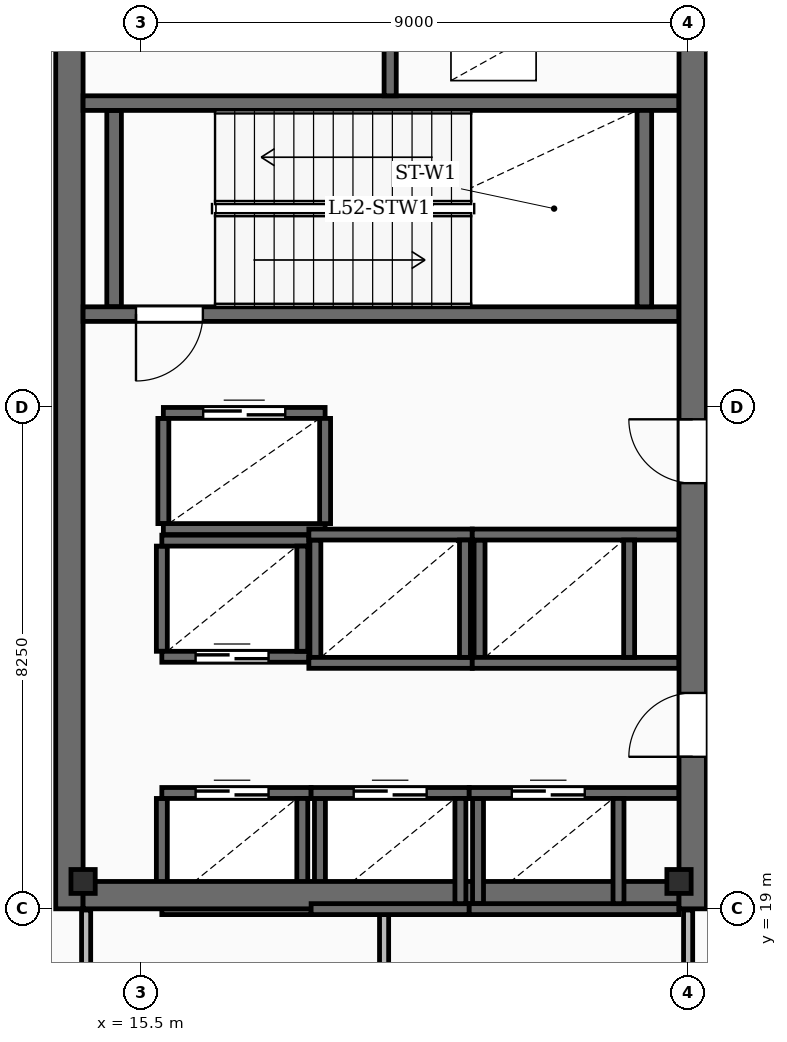
"""IFC4 building model, lengths in metres.
Left out: names, types, materials, properties, quantities, classifications, styles, units other than length and angle.
Written with IfcOpenShell. Run it as: python <this file> out.ifc"""

import sys

from ifc_helpers import new_model, si_unit, direction, frame, frame_2d, origin, origin_2d, place, context, subcontext, project, spatial, rectangle, i_section, extrude, element, fill, save


model = new_model("IFC4")
c1 = context("Model", 3, precision=1e-05, world=origin(), true_north=direction((0.0, 1.0)))
c2 = subcontext(c1, "Body", "Model", "MODEL_VIEW")
j1 = project(units=[si_unit("LENGTHUNIT", "METRE"), si_unit("PLANEANGLEUNIT", "RADIAN")], contexts=[c1])
p1 = place(None, origin())
s1 = spatial("IfcSite", under=j1, at=p1, CompositionType="ELEMENT")
p2 = place(p1, origin())
s2 = spatial("IfcBuilding", under=s1, at=p2, CompositionType="ELEMENT")
p3 = place(p2, frame((0.0, 0.0, 216.15)))
s3 = spatial("IfcBuildingStorey", under=s2, at=p3, CompositionType="ELEMENT", Elevation=216.15)
p4 = place(p3, frame((14.325, 19.0, -0.45), z_axis=(0.0, 0.0, 1.0), x_axis=(0.0, 1.0, 0.0)))
e1 = element("IfcWall", 1, at=p4, inside=s3, PredefinedType="SHEAR", context=c2, shape_type="SweptSolid", body=[
    extrude(rectangle(XDim=15.3, YDim=0.45, at=frame_2d((7.65, 0.0))), origin(), (0.0, 0.0, 1.0), 4.98),
])
p5 = place(p3, frame((24.575, 19.0, -0.45), z_axis=(0.0, 0.0, 1.0), x_axis=(0.0, 1.0, 0.0)))
e2 = element("IfcWall", 2, at=p5, inside=s3, PredefinedType="SHEAR", context=c2, shape_type="SweptSolid", body=[
    extrude(rectangle(XDim=15.3, YDim=0.45, at=frame_2d((7.65, 0.0))), origin(), (0.0, 0.0, 1.0), 4.98),
])
p6 = place(p5, frame((2.5, 0.0, 0.45)))
e3 = element("IfcOpeningElement", 3, at=p6, cuts=e2, PredefinedType="OPENING", context=c2, shape_type="SweptSolid", body=[
    extrude(rectangle(XDim=1.05, YDim=2.15, at=frame_2d((0.525, 1.075))), frame((0.0, 0.235, 0.0), z_axis=(0.0, -1.0, 0.0), x_axis=(1.0, 0.0, 0.0)), (0.0, 0.0, 1.0), 0.47),
])
p7 = place(p5, frame((7.0, 0.0, 0.45)))
e4 = element("IfcOpeningElement", 4, at=p7, cuts=e2, PredefinedType="OPENING", context=c2, shape_type="SweptSolid", body=[
    extrude(rectangle(XDim=1.05, YDim=2.15, at=frame_2d((0.525, 1.075))), frame((0.0, 0.235, 0.0), z_axis=(0.0, -1.0, 0.0), x_axis=(1.0, 0.0, 0.0)), (0.0, 0.0, 1.0), 0.47),
])
p8 = place(p3, frame((14.55, 19.225, -0.45), z_axis=(0.0, 0.0, 1.0), x_axis=(1.0, 0.0, 0.0)))
e5 = element("IfcWall", 5, at=p8, inside=s3, PredefinedType="SHEAR", context=c2, shape_type="SweptSolid", body=[
    extrude(rectangle(XDim=9.8, YDim=0.45, at=frame_2d((4.9, 0.0))), origin(), (0.0, 0.0, 1.0), 4.98),
])
for number, where, z_axis, x_axis in (
    (6, (14.55, 19.45, -0.45), (0.0, 0.0, 1.0), (1.0, 0.0, 0.0)),
    (7, (24.35, 19.45, -0.45), (0.0, 0.0, 1.0), (1.0, 0.0, 0.0)),
):
    element("IfcColumn", number, at=place(p3, frame(where, z_axis=z_axis, x_axis=x_axis)), inside=s3, PredefinedType="COLUMN", context=c2, shape_type="SweptSolid", body=[
        extrude(i_section(OverallWidth=0.399, OverallDepth=0.393, WebThickness=0.023, FlangeThickness=0.037, FilletRadius=0.02, at=origin_2d()), origin(), (0.0, 0.0, 1.0), 4.98),
    ])
p9 = place(p3, frame((10.211, 10.701, 0.0), z_axis=(0.0, 0.0, 1.0), x_axis=(0.113203107947, 0.993571867733, 0.0)))
e8 = element("IfcWall", 8, at=p9, inside=s3, PredefinedType="SOLIDWALL", context=c2, shape_type="SweptSolid", body=[
    extrude(rectangle(XDim=34.5, YDim=0.36, at=frame_2d((17.25, 0.0))), origin(), (0.0, 0.0, 1.0), 4.53),
])
p10 = place(p9, frame((4.2, 0.0, 0.88)))
e9 = element("IfcOpeningElement", 9, at=p10, cuts=e8, PredefinedType="OPENING", context=c2, shape_type="SweptSolid", body=[
    extrude(rectangle(XDim=1.35, YDim=2.2, at=frame_2d((0.675, 1.1))), frame((0.0, 0.19, 0.0), z_axis=(0.0, -1.0, 0.0), x_axis=(1.0, 0.0, 0.0)), (0.0, 0.0, 1.0), 0.38),
])
p11 = place(p9, frame((15.4, 0.0, 0.88)))
e10 = element("IfcOpeningElement", 10, at=p11, cuts=e8, PredefinedType="OPENING", context=c2, shape_type="SweptSolid", body=[
    extrude(rectangle(XDim=1.35, YDim=2.2, at=frame_2d((0.675, 1.1))), frame((0.0, 0.19, 0.0), z_axis=(0.0, -1.0, 0.0), x_axis=(1.0, 0.0, 0.0)), (0.0, 0.0, 1.0), 0.38),
])
p12 = place(p9, frame((26.6, 0.0, 0.88)))
e11 = element("IfcOpeningElement", 11, at=p12, cuts=e8, PredefinedType="OPENING", context=c2, shape_type="SweptSolid", body=[
    extrude(rectangle(XDim=1.35, YDim=2.2, at=frame_2d((0.675, 1.1))), frame((0.0, 0.19, 0.0), z_axis=(0.0, -1.0, 0.0), x_axis=(1.0, 0.0, 0.0)), (0.0, 0.0, 1.0), 0.38),
])
p13 = place(p3, frame((24.35, 28.78, 0.0), z_axis=(0.0, 0.0, 1.0), x_axis=(-1.0, 0.0, 0.0)))
e12 = element("IfcWall", 12, at=p13, inside=s3, PredefinedType="SOLIDWALL", context=c2, shape_type="SweptSolid", body=[
    extrude(rectangle(XDim=9.8, YDim=0.24, at=frame_2d((4.9, 0.0))), origin(), (0.0, 0.0, 1.0), 4.53),
])
p14 = place(p13, frame((7.83, 0.0, 0.0)))
e13 = element("IfcOpeningElement", 13, at=p14, cuts=e12, PredefinedType="OPENING", context=c2, shape_type="SweptSolid", body=[
    extrude(rectangle(XDim=1.1, YDim=2.15, at=frame_2d((0.55, 1.075))), frame((0.0, 0.13, 0.0), z_axis=(0.0, -1.0, 0.0), x_axis=(1.0, 0.0, 0.0)), (0.0, 0.0, 1.0), 0.26),
])
p15 = place(p3, frame((14.55, 32.25, 0.0), z_axis=(0.0, 0.0, 1.0), x_axis=(1.0, 0.0, 0.0)))
e14 = element("IfcWall", 14, at=p15, inside=s3, PredefinedType="SOLIDWALL", context=c2, shape_type="SweptSolid", body=[
    extrude(rectangle(XDim=9.8, YDim=0.24, at=frame_2d((4.9, 0.0))), origin(), (0.0, 0.0, 1.0), 4.53),
])
for number, where, z_axis, x_axis in (
    (15, (15.06, 28.9, 0.0), (0.0, 0.0, 1.0), (0.0, 1.0, 0.0)),
    (16, (23.78, 28.9, 0.0), (0.0, 0.0, 1.0), (0.0, 1.0, 0.0)),
):
    element("IfcWall", number, at=place(p3, frame(where, z_axis=z_axis, x_axis=x_axis)), inside=s3, PredefinedType="SOLIDWALL", context=c2, shape_type="SweptSolid", body=[
        extrude(rectangle(XDim=3.23, YDim=0.24, at=frame_2d((1.615, 0.0))), origin(), (0.0, 0.0, 1.0), 4.53),
    ])
p16 = place(p3, frame((19.6, 32.37, 0.0), z_axis=(0.0, 0.0, 1.0), x_axis=(0.0, 1.0, 0.0)))
e17 = element("IfcWall", 17, at=p16, inside=s3, PredefinedType="SOLIDWALL", context=c2, shape_type="SweptSolid", body=[
    extrude(rectangle(XDim=1.43, YDim=0.2, at=frame_2d((0.715, 0.0))), origin(), (0.0, 0.0, 1.0), 4.53),
])
p17 = place(p3, frame((15.845, 20.905, 0.0), z_axis=(0.0, 0.0, 1.0), x_axis=(1.0, 0.0, 0.0)))
e18 = element("IfcWall", 18, at=p17, inside=s3, PredefinedType="SOLIDWALL", context=c2, shape_type="SweptSolid", body=[
    extrude(rectangle(XDim=2.455, YDim=0.18, at=frame_2d((1.228, 0.0))), origin(), (0.0, 0.0, 1.0), 4.53),
])
p18 = place(p17, frame((0.555, 0.0, 0.0)))
e19 = element("IfcOpeningElement", 19, at=p18, cuts=e18, PredefinedType="OPENING", context=c2, shape_type="SweptSolid", body=[
    extrude(rectangle(XDim=1.2, YDim=2.2, at=frame_2d((0.6, 1.1))), frame((0.0, 0.1, 0.0), z_axis=(0.0, -1.0, 0.0), x_axis=(1.0, 0.0, 0.0)), (0.0, 0.0, 1.0), 0.2),
])
p19 = place(p3, frame((15.845, 18.995, 0.0), z_axis=(0.0, 0.0, 1.0), x_axis=(1.0, 0.0, 0.0)))
e20 = element("IfcWall", 20, at=p19, inside=s3, PredefinedType="SOLIDWALL", context=c2, shape_type="SweptSolid", body=[
    extrude(rectangle(XDim=2.455, YDim=0.18, at=frame_2d((1.228, 0.0))), origin(), (0.0, 0.0, 1.0), 4.53),
])
for number, where, z_axis, x_axis in (
    (21, (15.845, 19.085, 0.0), (0.0, 0.0, 1.0), (0.0, 1.0, 0.0)),
    (22, (18.155, 19.085, 0.0), (0.0, 0.0, 1.0), (0.0, 1.0, 0.0)),
):
    element("IfcWall", number, at=place(p3, frame(where, z_axis=z_axis, x_axis=x_axis)), inside=s3, PredefinedType="SOLIDWALL", context=c2, shape_type="SweptSolid", body=[
        extrude(rectangle(XDim=1.73, YDim=0.18, at=frame_2d((0.865, 0.0))), origin(), (0.0, 0.0, 1.0), 4.53),
    ])
p20 = place(p3, frame((18.3, 20.905, 0.0), z_axis=(0.0, 0.0, 1.0), x_axis=(1.0, 0.0, 0.0)))
e23 = element("IfcWall", 23, at=p20, inside=s3, PredefinedType="SOLIDWALL", context=c2, shape_type="SweptSolid", body=[
    extrude(rectangle(XDim=2.6, YDim=0.18, at=frame_2d((1.3, 0.0))), origin(), (0.0, 0.0, 1.0), 4.53),
])
p21 = place(p20, frame((0.7, 0.0, 0.0)))
e24 = element("IfcOpeningElement", 24, at=p21, cuts=e23, PredefinedType="OPENING", context=c2, shape_type="SweptSolid", body=[
    extrude(rectangle(XDim=1.2, YDim=2.2, at=frame_2d((0.6, 1.1))), frame((0.0, 0.1, 0.0), z_axis=(0.0, -1.0, 0.0), x_axis=(1.0, 0.0, 0.0)), (0.0, 0.0, 1.0), 0.2),
])
p22 = place(p3, frame((18.3, 18.995, 0.0), z_axis=(0.0, 0.0, 1.0), x_axis=(1.0, 0.0, 0.0)))
e25 = element("IfcWall", 25, at=p22, inside=s3, PredefinedType="SOLIDWALL", context=c2, shape_type="SweptSolid", body=[
    extrude(rectangle(XDim=2.6, YDim=0.18, at=frame_2d((1.3, 0.0))), origin(), (0.0, 0.0, 1.0), 4.53),
])
for number, where, z_axis, x_axis in (
    (26, (18.445, 19.085, 0.0), (0.0, 0.0, 1.0), (0.0, 1.0, 0.0)),
    (27, (20.755, 19.085, 0.0), (0.0, 0.0, 1.0), (0.0, 1.0, 0.0)),
):
    element("IfcWall", number, at=place(p3, frame(where, z_axis=z_axis, x_axis=x_axis)), inside=s3, PredefinedType="SOLIDWALL", context=c2, shape_type="SweptSolid", body=[
        extrude(rectangle(XDim=1.73, YDim=0.18, at=frame_2d((0.865, 0.0))), origin(), (0.0, 0.0, 1.0), 4.53),
    ])
p23 = place(p3, frame((20.9, 20.905, 0.0), z_axis=(0.0, 0.0, 1.0), x_axis=(1.0, 0.0, 0.0)))
e28 = element("IfcWall", 28, at=p23, inside=s3, PredefinedType="SOLIDWALL", context=c2, shape_type="SweptSolid", body=[
    extrude(rectangle(XDim=3.45, YDim=0.18, at=frame_2d((1.725, 0.0))), origin(), (0.0, 0.0, 1.0), 4.53),
])
p24 = place(p23, frame((0.7, 0.0, 0.0)))
e29 = element("IfcOpeningElement", 29, at=p24, cuts=e28, PredefinedType="OPENING", context=c2, shape_type="SweptSolid", body=[
    extrude(rectangle(XDim=1.2, YDim=2.2, at=frame_2d((0.6, 1.1))), frame((0.0, 0.1, 0.0), z_axis=(0.0, -1.0, 0.0), x_axis=(1.0, 0.0, 0.0)), (0.0, 0.0, 1.0), 0.2),
])
p25 = place(p3, frame((20.9, 18.995, 0.0), z_axis=(0.0, 0.0, 1.0), x_axis=(1.0, 0.0, 0.0)))
e30 = element("IfcWall", 30, at=p25, inside=s3, PredefinedType="SOLIDWALL", context=c2, shape_type="SweptSolid", body=[
    extrude(rectangle(XDim=3.45, YDim=0.18, at=frame_2d((1.725, 0.0))), origin(), (0.0, 0.0, 1.0), 4.53),
])
for number, where, z_axis, x_axis in (
    (31, (21.045, 19.085, 0.0), (0.0, 0.0, 1.0), (0.0, 1.0, 0.0)),
    (32, (23.355, 19.085, 0.0), (0.0, 0.0, 1.0), (0.0, 1.0, 0.0)),
):
    element("IfcWall", number, at=place(p3, frame(where, z_axis=z_axis, x_axis=x_axis)), inside=s3, PredefinedType="SOLIDWALL", context=c2, shape_type="SweptSolid", body=[
        extrude(rectangle(XDim=1.73, YDim=0.18, at=frame_2d((0.865, 0.0))), origin(), (0.0, 0.0, 1.0), 4.53),
    ])
p26 = place(p3, frame((15.845, 25.055, 0.0), z_axis=(0.0, 0.0, 1.0), x_axis=(1.0, 0.0, 0.0)))
e33 = element("IfcWall", 33, at=p26, inside=s3, PredefinedType="SOLIDWALL", context=c2, shape_type="SweptSolid", body=[
    extrude(rectangle(XDim=2.417, YDim=0.18, at=frame_2d((1.209, 0.0))), origin(), (0.0, 0.0, 1.0), 4.53),
])
p27 = place(p3, frame((15.845, 23.145, 0.0), z_axis=(0.0, 0.0, 1.0), x_axis=(1.0, 0.0, 0.0)))
e34 = element("IfcWall", 34, at=p27, inside=s3, PredefinedType="SOLIDWALL", context=c2, shape_type="SweptSolid", body=[
    extrude(rectangle(XDim=2.417, YDim=0.18, at=frame_2d((1.209, 0.0))), origin(), (0.0, 0.0, 1.0), 4.53),
])
p28 = place(p27, frame((0.555, 0.0, 0.0)))
e35 = element("IfcOpeningElement", 35, at=p28, cuts=e34, PredefinedType="OPENING", context=c2, shape_type="SweptSolid", body=[
    extrude(rectangle(XDim=1.2, YDim=2.2, at=frame_2d((0.6, 1.1))), frame((0.0, 0.1, 0.0), z_axis=(0.0, -1.0, 0.0), x_axis=(1.0, 0.0, 0.0)), (0.0, 0.0, 1.0), 0.2),
])
for number, where, z_axis, x_axis in (
    (36, (15.845, 23.235, 0.0), (0.0, 0.0, 1.0), (0.0, 1.0, 0.0)),
    (37, (18.155, 23.235, 0.0), (0.0, 0.0, 1.0), (0.0, 1.0, 0.0)),
):
    element("IfcWall", number, at=place(p3, frame(where, z_axis=z_axis, x_axis=x_axis)), inside=s3, PredefinedType="SOLIDWALL", context=c2, shape_type="SweptSolid", body=[
        extrude(rectangle(XDim=1.73, YDim=0.18, at=frame_2d((0.865, 0.0))), origin(), (0.0, 0.0, 1.0), 4.53),
    ])
for number, where, z_axis, x_axis in (
    (38, (18.262, 25.155, 0.0), (0.0, 0.0, 1.0), (1.0, 0.0, 0.0)),
    (39, (18.262, 23.045, 0.0), (0.0, 0.0, 1.0), (1.0, 0.0, 0.0)),
):
    element("IfcWall", number, at=place(p3, frame(where, z_axis=z_axis, x_axis=x_axis)), inside=s3, PredefinedType="SOLIDWALL", context=c2, shape_type="SweptSolid", body=[
        extrude(rectangle(XDim=2.688, YDim=0.18, at=frame_2d((1.344, 0.0))), origin(), (0.0, 0.0, 1.0), 4.53),
    ])
for number, where, z_axis, x_axis in (
    (40, (18.37, 23.135, 0.0), (0.0, 0.0, 1.0), (0.0, 1.0, 0.0)),
    (41, (20.83, 23.135, 0.0), (0.0, 0.0, 1.0), (0.0, 1.0, 0.0)),
):
    element("IfcWall", number, at=place(p3, frame(where, z_axis=z_axis, x_axis=x_axis)), inside=s3, PredefinedType="SOLIDWALL", context=c2, shape_type="SweptSolid", body=[
        extrude(rectangle(XDim=1.93, YDim=0.18, at=frame_2d((0.965, 0.0))), origin(), (0.0, 0.0, 1.0), 4.53),
    ])
for number, where, z_axis, x_axis in (
    (42, (20.95, 25.155, 0.0), (0.0, 0.0, 1.0), (1.0, 0.0, 0.0)),
    (43, (20.95, 23.045, 0.0), (0.0, 0.0, 1.0), (1.0, 0.0, 0.0)),
):
    element("IfcWall", number, at=place(p3, frame(where, z_axis=z_axis, x_axis=x_axis)), inside=s3, PredefinedType="SOLIDWALL", context=c2, shape_type="SweptSolid", body=[
        extrude(rectangle(XDim=3.4, YDim=0.18, at=frame_2d((1.7, 0.0))), origin(), (0.0, 0.0, 1.0), 4.53),
    ])
for number, where, z_axis, x_axis in (
    (44, (21.07, 23.135, 0.0), (0.0, 0.0, 1.0), (0.0, 1.0, 0.0)),
    (45, (23.53, 23.135, 0.0), (0.0, 0.0, 1.0), (0.0, 1.0, 0.0)),
):
    element("IfcWall", number, at=place(p3, frame(where, z_axis=z_axis, x_axis=x_axis)), inside=s3, PredefinedType="SOLIDWALL", context=c2, shape_type="SweptSolid", body=[
        extrude(rectangle(XDim=1.93, YDim=0.18, at=frame_2d((0.965, 0.0))), origin(), (0.0, 0.0, 1.0), 4.53),
    ])
p29 = place(p3, frame((15.87, 27.155, 0.0), z_axis=(0.0, 0.0, 1.0), x_axis=(1.0, 0.0, 0.0)))
e46 = element("IfcWall", 46, at=p29, inside=s3, PredefinedType="SOLIDWALL", context=c2, shape_type="SweptSolid", body=[
    extrude(rectangle(XDim=2.66, YDim=0.18, at=frame_2d((1.33, 0.0))), origin(), (0.0, 0.0, 1.0), 4.53),
])
p30 = place(p29, frame((0.655, 0.0, 0.0)))
e47 = element("IfcOpeningElement", 47, at=p30, cuts=e46, PredefinedType="OPENING", context=c2, shape_type="SweptSolid", body=[
    extrude(rectangle(XDim=1.35, YDim=2.3, at=frame_2d((0.675, 1.15))), frame((0.0, 0.1, 0.0), z_axis=(0.0, -1.0, 0.0), x_axis=(1.0, 0.0, 0.0)), (0.0, 0.0, 1.0), 0.2),
])
p31 = place(p3, frame((15.87, 25.245, 0.0), z_axis=(0.0, 0.0, 1.0), x_axis=(1.0, 0.0, 0.0)))
e48 = element("IfcWall", 48, at=p31, inside=s3, PredefinedType="SOLIDWALL", context=c2, shape_type="SweptSolid", body=[
    extrude(rectangle(XDim=2.66, YDim=0.18, at=frame_2d((1.33, 0.0))), origin(), (0.0, 0.0, 1.0), 4.53),
])
for number, where, z_axis, x_axis in (
    (49, (15.87, 25.335, 0.0), (0.0, 0.0, 1.0), (0.0, 1.0, 0.0)),
    (50, (18.53, 25.335, 0.0), (0.0, 0.0, 1.0), (0.0, 1.0, 0.0)),
):
    element("IfcWall", number, at=place(p3, frame(where, z_axis=z_axis, x_axis=x_axis)), inside=s3, PredefinedType="SOLIDWALL", context=c2, shape_type="SweptSolid", body=[
        extrude(rectangle(XDim=1.73, YDim=0.18, at=frame_2d((0.865, 0.0))), origin(), (0.0, 0.0, 1.0), 4.53),
    ])
for number, where, z_axis, x_axis in (
    (51, (19.5, 15.4, 0.0), (0.0, 0.0, 1.0), (0.0, 1.0, 0.0)),
    (52, (14.6, 15.4, 0.0), (0.0, 0.0, 1.0), (0.0, 1.0, 0.0)),
    (53, (24.5, 15.4, 0.0), (0.0, 0.0, 1.0), (0.0, 1.0, 0.0)),
):
    element("IfcWall", number, at=place(p3, frame(where, z_axis=z_axis, x_axis=x_axis)), inside=s3, PredefinedType="PARTITIONING", context=c2, shape_type="SweptSolid", body=[
        extrude(rectangle(XDim=3.58, YDim=0.15, at=frame_2d((1.79, 0.0))), origin(), (0.0, 0.0, 1.0), 3.59),
    ])
p32 = place(p6, origin())
e54 = element("IfcDoor", 54, at=p32, inside=s3, OperationType="SINGLE_SWING_LEFT", PredefinedType="DOOR", context=c2, shape_type="SweptSolid", body=[
    extrude(rectangle(XDim=1.05, YDim=2.15, at=frame_2d((0.525, 1.075))), frame((0.0, 0.025, 0.0), z_axis=(0.0, -1.0, 0.0), x_axis=(1.0, 0.0, 0.0)), (0.0, 0.0, 1.0), 0.05),
])
fill(e3, e54)
p33 = place(p7, origin())
e55 = element("IfcDoor", 55, at=p33, inside=s3, OperationType="SINGLE_SWING_RIGHT", PredefinedType="DOOR", context=c2, shape_type="SweptSolid", body=[
    extrude(rectangle(XDim=1.05, YDim=2.15, at=frame_2d((0.525, 1.075))), frame((0.0, 0.025, 0.0), z_axis=(0.0, -1.0, 0.0), x_axis=(1.0, 0.0, 0.0)), (0.0, 0.0, 1.0), 0.05),
])
fill(e4, e55)
p34 = place(p14, origin())
e56 = element("IfcDoor", 56, at=p34, inside=s3, OperationType="SINGLE_SWING_RIGHT", PredefinedType="DOOR", context=c2, shape_type="SweptSolid", body=[
    extrude(rectangle(XDim=1.1, YDim=2.15, at=frame_2d((0.55, 1.075))), frame((0.0, 0.025, 0.0), z_axis=(0.0, -1.0, 0.0), x_axis=(1.0, 0.0, 0.0)), (0.0, 0.0, 1.0), 0.05),
])
fill(e13, e56)
p35 = place(p18, origin())
e57 = element("IfcDoor", 57, at=p35, inside=s3, OperationType="DOUBLE_DOOR_SLIDING", PredefinedType="DOOR", context=c2, shape_type="SweptSolid", body=[
    extrude(rectangle(XDim=1.2, YDim=2.2, at=frame_2d((0.6, 1.1))), frame((0.0, 0.025, 0.0), z_axis=(0.0, -1.0, 0.0), x_axis=(1.0, 0.0, 0.0)), (0.0, 0.0, 1.0), 0.05),
])
fill(e19, e57)
p36 = place(p21, origin())
e58 = element("IfcDoor", 58, at=p36, inside=s3, OperationType="DOUBLE_DOOR_SLIDING", PredefinedType="DOOR", context=c2, shape_type="SweptSolid", body=[
    extrude(rectangle(XDim=1.2, YDim=2.2, at=frame_2d((0.6, 1.1))), frame((0.0, 0.025, 0.0), z_axis=(0.0, -1.0, 0.0), x_axis=(1.0, 0.0, 0.0)), (0.0, 0.0, 1.0), 0.05),
])
fill(e24, e58)
p37 = place(p24, origin())
e59 = element("IfcDoor", 59, at=p37, inside=s3, OperationType="DOUBLE_DOOR_SLIDING", PredefinedType="DOOR", context=c2, shape_type="SweptSolid", body=[
    extrude(rectangle(XDim=1.2, YDim=2.2, at=frame_2d((0.6, 1.1))), frame((0.0, 0.025, 0.0), z_axis=(0.0, -1.0, 0.0), x_axis=(1.0, 0.0, 0.0)), (0.0, 0.0, 1.0), 0.05),
])
fill(e29, e59)
p38 = place(p28, origin())
e60 = element("IfcDoor", 60, at=p38, inside=s3, OperationType="DOUBLE_DOOR_SLIDING", PredefinedType="DOOR", context=c2, shape_type="SweptSolid", body=[
    extrude(rectangle(XDim=1.2, YDim=2.2, at=frame_2d((0.6, 1.1))), frame((0.0, 0.025, 0.0), z_axis=(0.0, -1.0, 0.0), x_axis=(1.0, 0.0, 0.0)), (0.0, 0.0, 1.0), 0.05),
])
fill(e35, e60)
p39 = place(p30, origin())
e61 = element("IfcDoor", 61, at=p39, inside=s3, OperationType="DOUBLE_DOOR_SLIDING", PredefinedType="DOOR", context=c2, shape_type="SweptSolid", body=[
    extrude(rectangle(XDim=1.35, YDim=2.3, at=frame_2d((0.675, 1.15))), frame((0.0, 0.025, 0.0), z_axis=(0.0, -1.0, 0.0), x_axis=(1.0, 0.0, 0.0)), (0.0, 0.0, 1.0), 0.05),
])
fill(e47, e61)
save(model, sys.argv[1])
